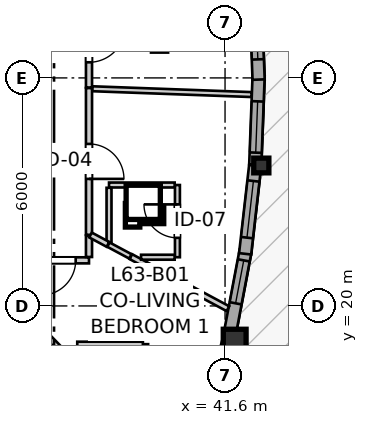
"""IFC4 building model, lengths in metres.
Left out: names, types, materials, properties, quantities, classifications, styles, units other than length and angle.
Written with IfcOpenShell. Run it as: python <this file> out.ifc"""

import sys

from ifc_helpers import new_model, si_unit, direction, frame, frame_2d, origin, origin_2d, place, context, subcontext, project, spatial, rectangle, i_section, extrude, source, transform, mapped, element, fill, save


model = new_model("IFC4")
c1 = context("Model", 3, precision=1e-05, world=origin(), true_north=direction((0.0, 1.0)))
c2 = subcontext(c1, "Body", "Model", "MODEL_VIEW")
j1 = project(units=[si_unit("LENGTHUNIT", "METRE"), si_unit("PLANEANGLEUNIT", "RADIAN")], contexts=[c1])
p1 = place(None, origin())
s1 = spatial("IfcSite", under=j1, at=p1, CompositionType="ELEMENT")
p2 = place(p1, origin())
s2 = spatial("IfcBuilding", under=s1, at=p2, CompositionType="ELEMENT")
p3 = place(p2, frame((0.0, 0.0, 211.6)))
s3 = spatial("IfcBuildingStorey", under=s2, at=p3, CompositionType="ELEMENT", Elevation=211.6)
m1 = source(origin(), c2, "Body", "SweptSolid", [
    extrude(rectangle(XDim=0.6, YDim=0.6, at=origin_2d()), origin(), (0.0, 0.0, 1.0), 2.96),
])
p4 = place(p3, frame((41.854, 19.086, 0.0), z_axis=(0.0, 0.0, 1.0), x_axis=(1.0, 0.0, 0.0)))
e1 = element("IfcColumn", 1, at=p4, inside=s3, PredefinedType="COLUMN", context=c2, shape_type="MappedRepresentation", body=[
    mapped(m1, transform((0.0, 0.0, 0.0), x_axis=(1.0, 0.0, 0.0), y_axis=(0.0, 1.0, 0.0), z_axis=(0.0, 0.0, 1.0), scale=1.0)),
])
m2 = source(origin(), c2, "Body", "SweptSolid", [
    extrude(i_section(OverallWidth=0.398, OverallDepth=0.387, WebThickness=0.019, FlangeThickness=0.03, FilletRadius=0.015, at=origin_2d()), origin(), (0.0, 0.0, 1.0), 2.96),
])
p5 = place(p3, frame((42.554, 23.696, 0.0), z_axis=(0.0, 0.0, 1.0), x_axis=(1.0, 0.0, 0.0)))
e2 = element("IfcColumn", 2, at=p5, inside=s3, PredefinedType="PILASTER", context=c2, shape_type="MappedRepresentation", body=[
    mapped(m2, transform((0.0, 0.0, 0.0), x_axis=(1.0, 0.0, 0.0), y_axis=(0.0, 1.0, 0.0), z_axis=(0.0, 0.0, 1.0), scale=1.0)),
])
p6 = place(p3, frame((41.076, 16.786, 0.0), z_axis=(0.0, 0.0, 1.0), x_axis=(0.257037260973, 0.966401493413, 0.0)))
e3 = element("IfcWall", 3, at=p6, inside=s3, PredefinedType="SOLIDWALL", context=c2, shape_type="SweptSolid", body=[
    extrude(rectangle(XDim=2.333, YDim=0.32, at=frame_2d((1.167, 0.0))), origin(), (0.0, 0.0, 1.0), 2.58),
])
p7 = place(p6, frame((0.446, 0.0, 0.82)))
e4 = element("IfcOpeningElement", 4, at=p7, cuts=e3, PredefinedType="OPENING", context=c2, shape_type="SweptSolid", body=[
    extrude(rectangle(XDim=1.45, YDim=1.25, at=frame_2d((0.725, 0.625))), frame((0.0, 0.17, 0.0), z_axis=(0.0, -1.0, 0.0), x_axis=(1.0, 0.0, 0.0)), (0.0, 0.0, 1.0), 0.34),
])
p8 = place(p3, frame((41.713, 19.205, 0.0), z_axis=(0.0, 0.0, 1.0), x_axis=(0.186691464441, 0.982418595663, 0.0)))
e5 = element("IfcWall", 5, at=p8, inside=s3, PredefinedType="SOLIDWALL", context=c2, shape_type="SweptSolid", body=[
    extrude(rectangle(XDim=2.294, YDim=0.32, at=frame_2d((1.147, 0.0))), origin(), (0.0, 0.0, 1.0), 2.58),
])
p9 = place(p8, frame((0.88, 0.0, 0.82)))
e6 = element("IfcOpeningElement", 6, at=p9, cuts=e5, PredefinedType="OPENING", context=c2, shape_type="SweptSolid", body=[
    extrude(rectangle(XDim=1.15, YDim=1.2, at=frame_2d((0.575, 0.6))), frame((0.0, 0.17, 0.0), z_axis=(0.0, -1.0, 0.0), x_axis=(1.0, 0.0, 0.0)), (0.0, 0.0, 1.0), 0.34),
])
p10 = place(p3, frame((42.128, 21.371, 0.0), z_axis=(0.0, 0.0, 1.0), x_axis=(0.113319777802, 0.993558567956, 0.0)))
e7 = element("IfcWall", 7, at=p10, inside=s3, PredefinedType="SOLIDWALL", context=c2, shape_type="SweptSolid", body=[
    extrude(rectangle(XDim=2.338, YDim=0.32, at=frame_2d((1.169, 0.0))), origin(), (0.0, 0.0, 1.0), 2.58),
])
p11 = place(p10, frame((0.429, 0.0, 0.82)))
e8 = element("IfcOpeningElement", 8, at=p11, cuts=e7, PredefinedType="OPENING", context=c2, shape_type="SweptSolid", body=[
    extrude(rectangle(XDim=1.5, YDim=1.45, at=frame_2d((0.75, 0.725))), frame((0.0, 0.17, 0.0), z_axis=(0.0, -1.0, 0.0), x_axis=(1.0, 0.0, 0.0)), (0.0, 0.0, 1.0), 0.34),
])
p12 = place(p3, frame((42.395, 23.722, 0.0), z_axis=(0.0, 0.0, 1.0), x_axis=(0.038025668885, 0.999276762717, 0.0)))
e9 = element("IfcWall", 9, at=p12, inside=s3, PredefinedType="SOLIDWALL", context=c2, shape_type="SweptSolid", body=[
    extrude(rectangle(XDim=2.324, YDim=0.32, at=frame_2d((1.162, 0.0))), origin(), (0.0, 0.0, 1.0), 2.58),
])
p13 = place(p12, frame((0.312, 0.0, 0.82)))
e10 = element("IfcOpeningElement", 10, at=p13, cuts=e9, PredefinedType="OPENING", context=c2, shape_type="SweptSolid", body=[
    extrude(rectangle(XDim=1.35, YDim=1.45, at=frame_2d((0.675, 0.725))), frame((0.0, 0.17, 0.0), z_axis=(0.0, -1.0, 0.0), x_axis=(1.0, 0.0, 0.0)), (0.0, 0.0, 1.0), 0.34),
])
p14 = place(p3, frame((42.483, 25.956, 0.0), z_axis=(0.0, 0.0, 1.0), x_axis=(-0.038013039165, 0.999277243238, 0.0)))
e11 = element("IfcWall", 11, at=p14, inside=s3, PredefinedType="SOLIDWALL", context=c2, shape_type="SweptSolid", body=[
    extrude(rectangle(XDim=2.254, YDim=0.32, at=frame_2d((1.127, 0.0))), origin(), (0.0, 0.0, 1.0), 2.58),
])
p15 = place(p14, frame((0.532, 0.0, 0.82)))
e12 = element("IfcOpeningElement", 12, at=p15, cuts=e11, PredefinedType="OPENING", context=c2, shape_type="SweptSolid", body=[
    extrude(rectangle(XDim=1.2, YDim=1.45, at=frame_2d((0.6, 0.725))), frame((0.0, 0.17, 0.0), z_axis=(0.0, -1.0, 0.0), x_axis=(1.0, 0.0, 0.0)), (0.0, 0.0, 1.0), 0.34),
])
p16 = place(p3, frame((38.02, 25.733, 0.0), z_axis=(0.0, 0.0, 1.0), x_axis=(0.0, -1.0, 0.0)))
e13 = element("IfcWall", 13, at=p16, inside=s3, PredefinedType="PARTITIONING", context=c2, shape_type="SweptSolid", body=[
    extrude(rectangle(XDim=3.862, YDim=0.16, at=frame_2d((1.931, 0.0))), origin(), (0.0, 0.0, 1.0), 2.96),
])
p17 = place(p16, frame((1.47, 0.0, 0.0)))
e14 = element("IfcOpeningElement", 14, at=p17, cuts=e13, PredefinedType="OPENING", context=c2, shape_type="SweptSolid", body=[
    extrude(rectangle(XDim=0.92, YDim=2.1, at=frame_2d((0.46, 1.05))), frame((0.0, 0.09, 0.0), z_axis=(0.0, -1.0, 0.0), x_axis=(1.0, 0.0, 0.0)), (0.0, 0.0, 1.0), 0.18),
])
p18 = place(p3, frame((38.02, 28.023, 0.0), z_axis=(0.0, 0.0, 1.0), x_axis=(0.0, -1.0, 0.0)))
e15 = element("IfcWall", 15, at=p18, inside=s3, PredefinedType="PARTITIONING", context=c2, shape_type="SweptSolid", body=[
    extrude(rectangle(XDim=2.275, YDim=0.16, at=frame_2d((1.137, 0.0))), origin(), (0.0, 0.0, 1.0), 2.96),
])
p19 = place(p18, frame((0.662, 0.0, 0.0)))
e16 = element("IfcOpeningElement", 16, at=p19, cuts=e15, PredefinedType="OPENING", context=c2, shape_type="SweptSolid", body=[
    extrude(rectangle(XDim=0.95, YDim=2.1, at=frame_2d((0.475, 1.05))), frame((0.0, 0.09, 0.0), z_axis=(0.0, -1.0, 0.0), x_axis=(1.0, 0.0, 0.0)), (0.0, 0.0, 1.0), 0.18),
])
p20 = place(p3, frame((39.511, 17.094, 0.0), z_axis=(0.0, 0.0, 1.0), x_axis=(0.0, 1.0, 0.0)))
e17 = element("IfcWall", 17, at=p20, inside=s3, PredefinedType="PARTITIONING", context=c2, shape_type="SweptSolid", body=[
    extrude(rectangle(XDim=1.9, YDim=0.13, at=frame_2d((0.95, 0.0))), origin(), (0.0, 0.0, 1.0), 2.96),
])
p21 = place(p20, frame((0.51, 0.0, 0.0)))
e18 = element("IfcOpeningElement", 18, at=p21, cuts=e17, PredefinedType="OPENING", context=c2, shape_type="SweptSolid", body=[
    extrude(rectangle(XDim=0.88, YDim=2.05, at=frame_2d((0.44, 1.025))), frame((0.0, 0.075, 0.0), z_axis=(0.0, -1.0, 0.0), x_axis=(1.0, 0.0, 0.0)), (0.0, 0.0, 1.0), 0.15),
])
p22 = place(p3, frame((40.347, 21.282, 0.0), z_axis=(0.0, 0.0, 1.0), x_axis=(0.0, 1.0, 0.0)))
e19 = element("IfcWall", 19, at=p22, inside=s3, PredefinedType="PARTITIONING", context=c2, shape_type="SweptSolid", body=[
    extrude(rectangle(XDim=1.9, YDim=0.13, at=frame_2d((0.95, 0.0))), origin(), (0.0, 0.0, 1.0), 2.598),
])
p23 = place(p22, frame((0.51, 0.0, 0.0)))
e20 = element("IfcOpeningElement", 20, at=p23, cuts=e19, PredefinedType="OPENING", context=c2, shape_type="SweptSolid", body=[
    extrude(rectangle(XDim=0.88, YDim=2.05, at=frame_2d((0.44, 1.025))), frame((0.0, 0.075, 0.0), z_axis=(0.0, -1.0, 0.0), x_axis=(1.0, 0.0, 0.0)), (0.0, 0.0, 1.0), 0.15),
])
p24 = place(p3, frame((38.02, 21.2, 0.0), z_axis=(0.0, 0.0, 1.0), x_axis=(-1.0, 0.0, 0.0)))
e21 = element("IfcWall", 21, at=p24, inside=s3, PredefinedType="PARTITIONING", context=c2, shape_type="SweptSolid", body=[
    extrude(rectangle(XDim=1.612, YDim=0.16, at=frame_2d((0.806, 0.0))), origin(), (0.0, 0.0, 1.0), 2.96),
])
p25 = place(p24, frame((0.35, 0.0, 0.0)))
e22 = element("IfcOpeningElement", 22, at=p25, cuts=e21, PredefinedType="OPENING", context=c2, shape_type="SweptSolid", body=[
    extrude(rectangle(XDim=0.92, YDim=2.1, at=frame_2d((0.46, 1.05))), frame((0.0, 0.09, 0.0), z_axis=(0.0, -1.0, 0.0), x_axis=(1.0, 0.0, 0.0)), (0.0, 0.0, 1.0), 0.18),
])
p26 = place(p3, frame((38.11, 25.715, 0.0), z_axis=(0.0, 0.0, 1.0), x_axis=(0.99933433165, -0.036481414253, 0.0)))
e23 = element("IfcWall", 23, at=p26, inside=s3, PredefinedType="PARTITIONING", context=c2, shape_type="SweptSolid", body=[
    extrude(rectangle(XDim=4.189, YDim=0.13, at=frame_2d((2.095, 0.0))), origin(), (0.0, 0.0, 1.0), 2.96),
])
p27 = place(p3, frame((39.122, 21.297, 0.0), z_axis=(0.0, 0.0, 1.0), x_axis=(0.881308328415, -0.472541670402, 0.0)))
e24 = element("IfcWall", 24, at=p27, inside=s3, PredefinedType="PARTITIONING", context=c2, shape_type="SweptSolid", body=[
    extrude(rectangle(XDim=2.898, YDim=0.145, at=frame_2d((1.449, 0.0))), origin(), (0.0, 0.0, 1.0), 2.96),
])
p28 = place(p3, frame((36.458, 19.686, 0.0), z_axis=(0.0, 0.0, 1.0), x_axis=(0.695231916786, -0.718785490868, 0.0)))
e25 = element("IfcWall", 25, at=p28, inside=s3, PredefinedType="PARTITIONING", context=c2, shape_type="SweptSolid", body=[
    extrude(rectangle(XDim=1.824, YDim=0.145, at=frame_2d((0.912, 0.0))), origin(), (0.0, 0.0, 1.0), 2.96),
])
p29 = place(p3, frame((37.711, 18.994, 0.0), z_axis=(0.0, 0.0, 1.0), x_axis=(1.0, 0.0, 0.0)))
e26 = element("IfcWall", 26, at=p29, inside=s3, PredefinedType="PARTITIONING", context=c2, shape_type="SweptSolid", body=[
    extrude(rectangle(XDim=1.727, YDim=0.13, at=frame_2d((0.864, 0.0))), origin(), (0.0, 0.0, 1.0), 2.96),
])
p30 = place(p3, frame((38.547, 23.182, 0.0), z_axis=(0.0, 0.0, 1.0), x_axis=(1.0, 0.0, 0.0)))
e27 = element("IfcWall", 27, at=p30, inside=s3, PredefinedType="PARTITIONING", context=c2, shape_type="SweptSolid", body=[
    extrude(rectangle(XDim=1.727, YDim=0.13, at=frame_2d((0.863, 0.0))), origin(), (0.0, 0.0, 1.0), 2.96),
])
p31 = place(p3, frame((38.547, 21.605, 0.0), z_axis=(0.0, 0.0, 1.0), x_axis=(0.0, 1.0, 0.0)))
e28 = element("IfcWall", 28, at=p31, inside=s3, PredefinedType="PARTITIONING", context=c2, shape_type="SweptSolid", body=[
    extrude(rectangle(XDim=1.504, YDim=0.13, at=frame_2d((0.752, 0.0))), origin(), (0.0, 0.0, 1.0), 2.628),
])
p32 = place(p3, frame((39.39, 21.282, 0.0), z_axis=(0.0, 0.0, 1.0), x_axis=(1.0, 0.0, 0.0)))
e29 = element("IfcWall", 29, at=p32, inside=s3, PredefinedType="PARTITIONING", context=c2, shape_type="SweptSolid", body=[
    extrude(rectangle(XDim=0.884, YDim=0.13, at=frame_2d((0.442, 0.0))), origin(), (0.0, 0.0, 1.0), 2.96),
])
p33 = place(p3, frame((38.02, 21.288, 0.0), z_axis=(0.0, 0.0, 1.0), x_axis=(0.0, 1.0, 0.0)))
e30 = element("IfcWall", 30, at=p33, inside=s3, PredefinedType="PARTITIONING", context=c2, shape_type="SweptSolid", body=[
    extrude(rectangle(XDim=0.568, YDim=0.16, at=frame_2d((0.284, 0.0))), origin(), (0.0, 0.0, 1.0), 2.96),
])
p34 = place(p3, frame((38.532, 21.613, 0.0), z_axis=(0.0, 0.0, 1.0), x_axis=(0.881618593919, -0.471962556626, 0.0)))
e31 = element("IfcWall", 31, at=p34, inside=s3, PredefinedType="PARTITIONING", context=c2, shape_type="SweptSolid", body=[
    extrude(rectangle(XDim=0.654, YDim=0.13, at=frame_2d((0.327, 0.0))), origin(), (0.0, 0.0, 1.0), 2.96),
])
p35 = place(p3, frame((38.06, 21.867, 0.0), z_axis=(0.0, 0.0, 1.0), x_axis=(0.881026965879, -0.473066047601, 0.0)))
e32 = element("IfcWall", 32, at=p35, inside=s3, PredefinedType="PARTITIONING", context=c2, shape_type="SweptSolid", body=[
    extrude(rectangle(XDim=0.521, YDim=0.145, at=frame_2d((0.261, 0.0))), origin(), (0.0, 0.0, 1.0), 2.96),
])
m3 = source(origin(), c2, "Body", "SweptSolid", [
    extrude(rectangle(XDim=1.15, YDim=1.2, at=frame_2d((0.575, 0.6))), frame((0.0, 0.03, 0.0), z_axis=(0.0, -1.0, 0.0), x_axis=(1.0, 0.0, 0.0)), (0.0, 0.0, 1.0), 0.06),
])
p36 = place(p9, origin())
e33 = element("IfcWindow", 33, at=p36, inside=s3, PartitioningType="SINGLE_PANEL", PredefinedType="WINDOW", context=c2, shape_type="MappedRepresentation", body=[
    mapped(m3, transform((0.0, 0.0, 0.0), x_axis=(1.0, 0.0, 0.0), y_axis=(0.0, 1.0, 0.0), z_axis=(0.0, 0.0, 1.0), scale=1.0)),
])
fill(e6, e33)
m4 = source(origin(), c2, "Body", "SweptSolid", [
    extrude(rectangle(XDim=1.5, YDim=1.45, at=frame_2d((0.75, 0.725))), frame((0.0, 0.03, 0.0), z_axis=(0.0, -1.0, 0.0), x_axis=(1.0, 0.0, 0.0)), (0.0, 0.0, 1.0), 0.06),
])
p37 = place(p11, origin())
e34 = element("IfcWindow", 34, at=p37, inside=s3, PartitioningType="SINGLE_PANEL", PredefinedType="WINDOW", context=c2, shape_type="MappedRepresentation", body=[
    mapped(m4, transform((0.0, 0.0, 0.0), x_axis=(1.0, 0.0, 0.0), y_axis=(0.0, 1.0, 0.0), z_axis=(0.0, 0.0, 1.0), scale=1.0)),
])
fill(e8, e34)
m5 = source(origin(), c2, "Body", "SweptSolid", [
    extrude(rectangle(XDim=1.35, YDim=1.45, at=frame_2d((0.675, 0.725))), frame((0.0, 0.03, 0.0), z_axis=(0.0, -1.0, 0.0), x_axis=(1.0, 0.0, 0.0)), (0.0, 0.0, 1.0), 0.06),
])
p38 = place(p13, origin())
e35 = element("IfcWindow", 35, at=p38, inside=s3, PartitioningType="SINGLE_PANEL", PredefinedType="WINDOW", context=c2, shape_type="MappedRepresentation", body=[
    mapped(m5, transform((0.0, 0.0, 0.0), x_axis=(1.0, 0.0, 0.0), y_axis=(0.0, 1.0, 0.0), z_axis=(0.0, 0.0, 1.0), scale=1.0)),
])
fill(e10, e35)
m6 = source(origin(), c2, "Body", "SweptSolid", [
    extrude(rectangle(XDim=1.2, YDim=1.45, at=frame_2d((0.6, 0.725))), frame((0.0, 0.03, 0.0), z_axis=(0.0, -1.0, 0.0), x_axis=(1.0, 0.0, 0.0)), (0.0, 0.0, 1.0), 0.06),
])
p39 = place(p15, origin())
e36 = element("IfcWindow", 36, at=p39, inside=s3, PartitioningType="SINGLE_PANEL", PredefinedType="WINDOW", context=c2, shape_type="MappedRepresentation", body=[
    mapped(m6, transform((0.0, 0.0, 0.0), x_axis=(1.0, 0.0, 0.0), y_axis=(0.0, 1.0, 0.0), z_axis=(0.0, 0.0, 1.0), scale=1.0)),
])
fill(e12, e36)
m7 = source(origin(), c2, "Body", "SweptSolid", [
    extrude(rectangle(XDim=0.92, YDim=2.1, at=frame_2d((0.46, 1.05))), frame((0.0, 0.025, 0.0), z_axis=(0.0, -1.0, 0.0), x_axis=(1.0, 0.0, 0.0)), (0.0, 0.0, 1.0), 0.05),
])
p40 = place(p17, origin())
e37 = element("IfcDoor", 37, at=p40, inside=s3, OperationType="SINGLE_SWING_RIGHT", PredefinedType="DOOR", context=c2, shape_type="MappedRepresentation", body=[
    mapped(m7, transform((0.0, 0.0, 0.0), x_axis=(1.0, 0.0, 0.0), y_axis=(0.0, 1.0, 0.0), z_axis=(0.0, 0.0, 1.0), scale=1.0)),
])
fill(e14, e37)
m8 = source(origin(), c2, "Body", "SweptSolid", [
    extrude(rectangle(XDim=0.95, YDim=2.1, at=frame_2d((0.475, 1.05))), frame((0.0, 0.025, 0.0), z_axis=(0.0, -1.0, 0.0), x_axis=(1.0, 0.0, 0.0)), (0.0, 0.0, 1.0), 0.05),
])
p41 = place(p19, origin())
e38 = element("IfcDoor", 38, at=p41, inside=s3, OperationType="SINGLE_SWING_LEFT", PredefinedType="DOOR", context=c2, shape_type="MappedRepresentation", body=[
    mapped(m8, transform((0.0, 0.0, 0.0), x_axis=(1.0, 0.0, 0.0), y_axis=(0.0, 1.0, 0.0), z_axis=(0.0, 0.0, 1.0), scale=1.0)),
])
fill(e16, e38)
m9 = source(origin(), c2, "Body", "SweptSolid", [
    extrude(rectangle(XDim=0.88, YDim=2.05, at=frame_2d((0.44, 1.025))), frame((0.0, 0.025, 0.0), z_axis=(0.0, -1.0, 0.0), x_axis=(1.0, 0.0, 0.0)), (0.0, 0.0, 1.0), 0.05),
])
p42 = place(p23, origin())
e39 = element("IfcDoor", 39, at=p42, inside=s3, OperationType="SINGLE_SWING_RIGHT", PredefinedType="DOOR", context=c2, shape_type="MappedRepresentation", body=[
    mapped(m9, transform((0.0, 0.0, 0.0), x_axis=(1.0, 0.0, 0.0), y_axis=(0.0, 1.0, 0.0), z_axis=(0.0, 0.0, 1.0), scale=1.0)),
])
fill(e20, e39)
p43 = place(p25, origin())
e40 = element("IfcDoor", 40, at=p43, inside=s3, OperationType="SINGLE_SWING_RIGHT", PredefinedType="DOOR", context=c2, shape_type="MappedRepresentation", body=[
    mapped(m7, transform((0.0, 0.0, 0.0), x_axis=(1.0, 0.0, 0.0), y_axis=(0.0, 1.0, 0.0), z_axis=(0.0, 0.0, 1.0), scale=1.0)),
])
fill(e22, e40)
save(model, sys.argv[1])
